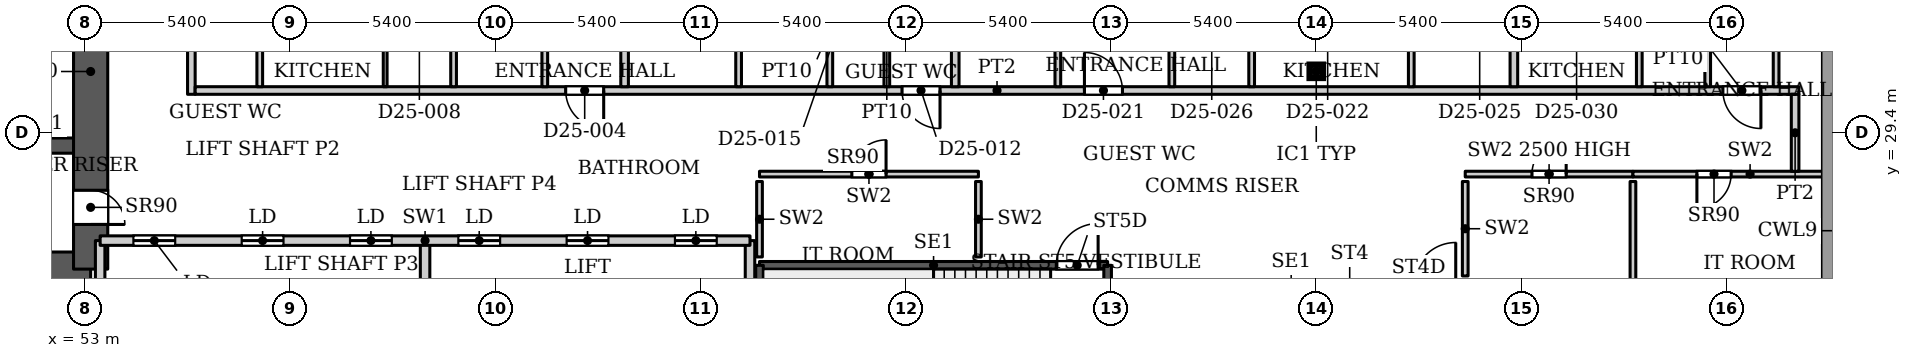
"""IFC4 building model, lengths in metres.
Left out: names, types, materials, properties, quantities, classifications, styles, units other than length and angle.
Written with IfcOpenShell. Run it as: python <this file> out.ifc"""

import sys

from ifc_helpers import new_model, si_unit, direction, frame, frame_2d, origin, origin_2d, place, context, subcontext, project, spatial, rectangle, hollow_rectangle, extrude, source, transform, mapped, element, fill, save


model = new_model("IFC4")
c1 = context("Model", 3, precision=1e-05, world=origin(), true_north=direction((0.0, 1.0)))
c2 = subcontext(c1, "Body", "Model", "MODEL_VIEW")
j1 = project(units=[si_unit("LENGTHUNIT", "METRE"), si_unit("PLANEANGLEUNIT", "RADIAN")], contexts=[c1])
p1 = place(None, origin())
s1 = spatial("IfcSite", under=j1, at=p1, CompositionType="ELEMENT")
p2 = place(p1, origin())
s2 = spatial("IfcBuilding", under=s1, at=p2, CompositionType="ELEMENT")
p3 = place(p2, frame((0.0, 0.0, 113.6)))
s3 = spatial("IfcBuildingStorey", under=s2, at=p3, CompositionType="ELEMENT", Elevation=113.6)
p4 = place(p3, frame((85.4, 31.005, 0.0), z_axis=(0.0, 0.0, 1.0), x_axis=(1.0, 0.0, 0.0)))
e1 = element("IfcColumn", 1, at=p4, inside=s3, PredefinedType="COLUMN", context=c2, shape_type="SweptSolid", body=[
    extrude(hollow_rectangle(XDim=0.356, YDim=0.356, WallThickness=0.016, InnerFilletRadius=0.016, OuterFilletRadius=0.032, at=origin_2d()), origin(), (0.0, 0.0, 1.0), 3.9),
])
p5 = place(p3, frame((34.75, 25.8, 0.0), z_axis=(0.0, 0.0, 1.0), x_axis=(1.0, 0.0, 0.0)))
e2 = element("IfcWall", 2, at=p5, inside=s3, PredefinedType="SHEAR", context=c2, shape_type="SweptSolid", body=[
    extrude(rectangle(XDim=18.4, YDim=0.9, at=frame_2d((9.2, 0.0))), origin(), (0.0, 0.0, 1.0), 3.9),
])
p6 = place(p3, frame((34.75, 29.05, 0.0), z_axis=(0.0, 0.0, 1.0), x_axis=(1.0, 0.0, 0.0)))
e3 = element("IfcWall", 3, at=p6, inside=s3, PredefinedType="SHEAR", context=c2, shape_type="SweptSolid", body=[
    extrude(rectangle(XDim=18.4, YDim=0.4, at=frame_2d((9.2, 0.0))), origin(), (0.0, 0.0, 1.0), 3.9),
])
p7 = place(p6, frame((15.125, 0.0, 0.0)))
e4 = element("IfcOpeningElement", 4, at=p7, cuts=e3, PredefinedType="OPENING", context=c2, shape_type="SweptSolid", body=[
    extrude(rectangle(XDim=1.1, YDim=2.2, at=frame_2d((0.55, 1.1))), frame((0.0, 0.21, 0.0), z_axis=(0.0, -1.0, 0.0), x_axis=(1.0, 0.0, 0.0)), (0.0, 0.0, 1.0), 0.42),
])
p8 = place(p3, frame((53.15, 25.8, 0.0), z_axis=(0.0, 0.0, 1.0), x_axis=(0.0, 1.0, 0.0)))
e5 = element("IfcWall", 5, at=p8, inside=s3, PredefinedType="SHEAR", context=c2, shape_type="SweptSolid", body=[
    extrude(rectangle(XDim=10.4, YDim=0.9, at=frame_2d((5.2, 0.0))), origin(), (0.0, 0.0, 1.0), 3.9),
])
p9 = place(p8, frame((1.175, 0.0, 0.0)))
e6 = element("IfcOpeningElement", 6, at=p9, cuts=e5, PredefinedType="OPENING", context=c2, shape_type="SweptSolid", body=[
    extrude(rectangle(XDim=0.9, YDim=2.2, at=frame_2d((0.45, 1.1))), frame((0.0, 0.46, 0.0), z_axis=(0.0, -1.0, 0.0), x_axis=(1.0, 0.0, 0.0)), (0.0, 0.0, 1.0), 0.92),
])
p10 = place(p3, frame((70.75, 25.9, 0.0), z_axis=(0.0, 0.0, 1.0), x_axis=(1.0, 0.0, 0.0)))
e7 = element("IfcWall", 7, at=p10, inside=s3, PredefinedType="SHEAR", context=c2, shape_type="SweptSolid", body=[
    extrude(rectangle(XDim=9.16, YDim=0.2, at=frame_2d((4.58, 0.0))), origin(), (0.0, 0.0, 1.0), 3.9),
])
p11 = place(p10, frame((7.81, 0.0, 0.0)))
e8 = element("IfcOpeningElement", 8, at=p11, cuts=e7, PredefinedType="OPENING", context=c2, shape_type="SweptSolid", body=[
    extrude(rectangle(XDim=1.1, YDim=2.2, at=frame_2d((0.55, 1.1))), frame((0.0, 0.11, 0.0), z_axis=(0.0, -1.0, 0.0), x_axis=(1.0, 0.0, 0.0)), (0.0, 0.0, 1.0), 0.22),
])
for number, where, z_axis, x_axis in (
    (9, (70.75, 22.75, 0.0), (0.0, 0.0, 1.0), (0.0, 1.0, 0.0)),
    (10, (79.91, 22.75, 0.0), (0.0, 0.0, 1.0), (0.0, 1.0, 0.0)),
):
    element("IfcWall", number, at=place(p3, frame(where, z_axis=z_axis, x_axis=x_axis)), inside=s3, PredefinedType="SHEAR", context=c2, shape_type="SweptSolid", body=[
        extrude(rectangle(XDim=3.15, YDim=0.2, at=frame_2d((1.575, 0.0))), origin(), (0.0, 0.0, 1.0), 3.9),
    ])
for number, where, z_axis, x_axis in (
    (11, (53.4, 23.7, 0.0), (0.0, 0.0, 1.0), (0.0, 1.0, 0.0)),
    (12, (61.95, 23.7, 0.0), (0.0, 0.0, 1.0), (0.0, 1.0, 0.0)),
    (13, (70.5, 23.7, 0.0), (0.0, 0.0, 1.0), (0.0, 1.0, 0.0)),
):
    element("IfcWall", number, at=place(p3, frame(where, z_axis=z_axis, x_axis=x_axis)), inside=s3, PredefinedType="PARTITIONING", context=c2, shape_type="SweptSolid", body=[
        extrude(rectangle(XDim=2.85, YDim=0.25, at=frame_2d((1.425, 0.0))), origin(), (0.0, 0.0, 1.0), 3.9),
    ])
p12 = place(p3, frame((53.4, 26.55, 0.0), z_axis=(0.0, 0.0, 1.0), x_axis=(1.0, 0.0, 0.0)))
e14 = element("IfcWall", 14, at=p12, inside=s3, PredefinedType="PARTITIONING", context=c2, shape_type="SweptSolid", body=[
    extrude(rectangle(XDim=17.1, YDim=0.25, at=frame_2d((8.55, 0.0))), origin(), (0.0, 0.0, 1.0), 3.9),
])
p13 = place(p12, frame((0.875, 0.0, 0.0)))
e15 = element("IfcOpeningElement", 15, at=p13, cuts=e14, PredefinedType="OPENING", context=c2, shape_type="SweptSolid", body=[
    extrude(rectangle(XDim=1.1, YDim=2.2, at=frame_2d((0.55, 1.1))), frame((0.0, 0.135, 0.0), z_axis=(0.0, -1.0, 0.0), x_axis=(1.0, 0.0, 0.0)), (0.0, 0.0, 1.0), 0.27),
])
p14 = place(p12, frame((3.725, 0.0, 0.0)))
e16 = element("IfcOpeningElement", 16, at=p14, cuts=e14, PredefinedType="OPENING", context=c2, shape_type="SweptSolid", body=[
    extrude(rectangle(XDim=1.1, YDim=2.2, at=frame_2d((0.55, 1.1))), frame((0.0, 0.135, 0.0), z_axis=(0.0, -1.0, 0.0), x_axis=(1.0, 0.0, 0.0)), (0.0, 0.0, 1.0), 0.27),
])
p15 = place(p12, frame((6.575, 0.0, 0.0)))
e17 = element("IfcOpeningElement", 17, at=p15, cuts=e14, PredefinedType="OPENING", context=c2, shape_type="SweptSolid", body=[
    extrude(rectangle(XDim=1.1, YDim=2.2, at=frame_2d((0.55, 1.1))), frame((0.0, 0.135, 0.0), z_axis=(0.0, -1.0, 0.0), x_axis=(1.0, 0.0, 0.0)), (0.0, 0.0, 1.0), 0.27),
])
p16 = place(p12, frame((9.425, 0.0, 0.0)))
e18 = element("IfcOpeningElement", 18, at=p16, cuts=e14, PredefinedType="OPENING", context=c2, shape_type="SweptSolid", body=[
    extrude(rectangle(XDim=1.1, YDim=2.2, at=frame_2d((0.55, 1.1))), frame((0.0, 0.135, 0.0), z_axis=(0.0, -1.0, 0.0), x_axis=(1.0, 0.0, 0.0)), (0.0, 0.0, 1.0), 0.27),
])
p17 = place(p12, frame((12.275, 0.0, 0.0)))
e19 = element("IfcOpeningElement", 19, at=p17, cuts=e14, PredefinedType="OPENING", context=c2, shape_type="SweptSolid", body=[
    extrude(rectangle(XDim=1.1, YDim=2.2, at=frame_2d((0.55, 1.1))), frame((0.0, 0.135, 0.0), z_axis=(0.0, -1.0, 0.0), x_axis=(1.0, 0.0, 0.0)), (0.0, 0.0, 1.0), 0.27),
])
p18 = place(p12, frame((15.125, 0.0, 0.0)))
e20 = element("IfcOpeningElement", 20, at=p18, cuts=e14, PredefinedType="OPENING", context=c2, shape_type="SweptSolid", body=[
    extrude(rectangle(XDim=1.1, YDim=2.2, at=frame_2d((0.55, 1.1))), frame((0.0, 0.135, 0.0), z_axis=(0.0, -1.0, 0.0), x_axis=(1.0, 0.0, 0.0)), (0.0, 0.0, 1.0), 0.27),
])
p19 = place(p3, frame((70.75, 28.3, 0.0), z_axis=(0.0, 0.0, 1.0), x_axis=(1.0, 0.0, 0.0)))
e21 = element("IfcWall", 21, at=p19, inside=s3, PredefinedType="PARTITIONING", context=c2, shape_type="SweptSolid", body=[
    extrude(rectangle(XDim=5.76, YDim=0.15, at=frame_2d((2.88, 0.0))), origin(), (0.0, 0.0, 1.0), 3.9),
])
p20 = place(p19, frame((2.43, 0.0, 0.0)))
e22 = element("IfcOpeningElement", 22, at=p20, cuts=e21, PredefinedType="OPENING", context=c2, shape_type="SweptSolid", body=[
    extrude(rectangle(XDim=0.9, YDim=2.2, at=frame_2d((0.45, 1.1))), frame((0.0, 0.085, 0.0), z_axis=(0.0, -1.0, 0.0), x_axis=(1.0, 0.0, 0.0)), (0.0, 0.0, 1.0), 0.17),
])
for number, where, z_axis, x_axis in (
    (23, (70.75, 26.12, 0.0), (0.0, 0.0, 1.0), (0.0, 1.0, 0.0)),
    (24, (76.51, 26.12, 0.0), (0.0, 0.0, 1.0), (0.0, 1.0, 0.0)),
):
    element("IfcWall", number, at=place(p3, frame(where, z_axis=z_axis, x_axis=x_axis)), inside=s3, PredefinedType="PARTITIONING", context=c2, shape_type="SweptSolid", body=[
        extrude(rectangle(XDim=1.985, YDim=0.15, at=frame_2d((0.992, 0.0))), origin(), (0.0, 0.0, 1.0), 3.9),
    ])
p21 = place(p3, frame((89.32, 28.3, 0.0), z_axis=(0.0, 0.0, 1.0), x_axis=(1.0, 0.0, 0.0)))
e25 = element("IfcWall", 25, at=p21, inside=s3, PredefinedType="PARTITIONING", context=c2, shape_type="SweptSolid", body=[
    extrude(rectangle(XDim=4.413, YDim=0.15, at=frame_2d((2.207, 0.0))), origin(), (0.0, 0.0, 1.0), 2.5),
])
p22 = place(p21, frame((1.756, 0.0, 0.0)))
e26 = element("IfcOpeningElement", 26, at=p22, cuts=e25, PredefinedType="OPENING", context=c2, shape_type="SweptSolid", body=[
    extrude(rectangle(XDim=0.9, YDim=2.2, at=frame_2d((0.45, 1.1))), frame((0.0, 0.085, 0.0), z_axis=(0.0, -1.0, 0.0), x_axis=(1.0, 0.0, 0.0)), (0.0, 0.0, 1.0), 0.17),
])
p23 = place(p3, frame((89.32, 25.62, 0.0), z_axis=(0.0, 0.0, 1.0), x_axis=(0.0, 1.0, 0.0)))
e27 = element("IfcWall", 27, at=p23, inside=s3, PredefinedType="PARTITIONING", context=c2, shape_type="SweptSolid", body=[
    extrude(rectangle(XDim=2.485, YDim=0.15, at=frame_2d((1.242, 0.0))), origin(), (0.0, 0.0, 1.0), 3.9),
])
p24 = place(p3, frame((93.733, 21.338, 0.0), z_axis=(0.0, 0.0, 1.0), x_axis=(0.0, 1.0, 0.0)))
e28 = element("IfcWall", 28, at=p24, inside=s3, PredefinedType="PARTITIONING", context=c2, shape_type="SweptSolid", body=[
    extrude(rectangle(XDim=6.767, YDim=0.15, at=frame_2d((3.384, 0.0))), origin(), (0.0, 0.0, 1.0), 3.9),
])
p25 = place(p3, frame((93.733, 28.3, 0.0), z_axis=(0.0, 0.0, 1.0), x_axis=(1.0, 0.0, 0.0)))
e29 = element("IfcWall", 29, at=p25, inside=s3, PredefinedType="PARTITIONING", context=c2, shape_type="SweptSolid", body=[
    extrude(rectangle(XDim=6.165, YDim=0.15, at=frame_2d((3.083, 0.0))), origin(), (0.0, 0.0, 1.0), 3.9),
])
p26 = place(p25, frame((1.683, 0.0, 0.0)))
e30 = element("IfcOpeningElement", 30, at=p26, cuts=e29, PredefinedType="OPENING", context=c2, shape_type="SweptSolid", body=[
    extrude(rectangle(XDim=0.9, YDim=2.2, at=frame_2d((0.45, 1.1))), frame((0.0, 0.085, 0.0), z_axis=(0.0, -1.0, 0.0), x_axis=(1.0, 0.0, 0.0)), (0.0, 0.0, 1.0), 0.17),
])
p27 = place(p3, frame((55.8, 30.4, 0.0), z_axis=(0.0, 0.0, 1.0), x_axis=(0.0, 1.0, 0.0)))
e31 = element("IfcWall", 31, at=p27, inside=s3, PredefinedType="PARTITIONING", context=c2, shape_type="SweptSolid", body=[
    extrude(rectangle(XDim=13.5, YDim=0.2, at=frame_2d((6.75, 0.0))), origin(), (0.0, 0.0, 1.0), 3.6),
])
p28 = place(p3, frame((55.9, 30.5, 0.0), z_axis=(0.0, 0.0, 1.0), x_axis=(1.0, 0.0, 0.0)))
e32 = element("IfcWall", 32, at=p28, inside=s3, PredefinedType="PARTITIONING", context=c2, shape_type="SweptSolid", body=[
    extrude(rectangle(XDim=42.2, YDim=0.2, at=frame_2d((21.1, 0.0))), origin(), (0.0, 0.0, 1.0), 3.6),
])
p29 = place(p28, frame((9.75, 0.0, 0.0)))
e33 = element("IfcOpeningElement", 33, at=p29, cuts=e32, PredefinedType="OPENING", context=c2, shape_type="SweptSolid", body=[
    extrude(rectangle(XDim=1.0, YDim=2.1, at=frame_2d((0.5, 1.05))), frame((0.0, 0.11, 0.0), z_axis=(0.0, -1.0, 0.0), x_axis=(1.0, 0.0, 0.0)), (0.0, 0.0, 1.0), 0.22),
])
p30 = place(p28, frame((18.6, 0.0, 0.0)))
e34 = element("IfcOpeningElement", 34, at=p30, cuts=e32, PredefinedType="OPENING", context=c2, shape_type="SweptSolid", body=[
    extrude(rectangle(XDim=1.0, YDim=2.1, at=frame_2d((0.5, 1.05))), frame((0.0, 0.11, 0.0), z_axis=(0.0, -1.0, 0.0), x_axis=(1.0, 0.0, 0.0)), (0.0, 0.0, 1.0), 0.22),
])
p31 = place(p28, frame((23.4, 0.0, 0.0)))
e35 = element("IfcOpeningElement", 35, at=p31, cuts=e32, PredefinedType="OPENING", context=c2, shape_type="SweptSolid", body=[
    extrude(rectangle(XDim=1.0, YDim=2.1, at=frame_2d((0.5, 1.05))), frame((0.0, 0.11, 0.0), z_axis=(0.0, -1.0, 0.0), x_axis=(1.0, 0.0, 0.0)), (0.0, 0.0, 1.0), 0.22),
])
p32 = place(p28, frame((40.2, 0.0, 0.0)))
e36 = element("IfcOpeningElement", 36, at=p32, cuts=e32, PredefinedType="OPENING", context=c2, shape_type="SweptSolid", body=[
    extrude(rectangle(XDim=1.0, YDim=2.1, at=frame_2d((0.5, 1.05))), frame((0.0, 0.11, 0.0), z_axis=(0.0, -1.0, 0.0), x_axis=(1.0, 0.0, 0.0)), (0.0, 0.0, 1.0), 0.22),
])
p33 = place(p3, frame((57.6, 30.6, 0.0), z_axis=(0.0, 0.0, 1.0), x_axis=(0.0, 1.0, 0.0)))
e37 = element("IfcWall", 37, at=p33, inside=s3, PredefinedType="PARTITIONING", context=c2, shape_type="SweptSolid", body=[
    extrude(rectangle(XDim=3.025, YDim=0.15, at=frame_2d((1.512, 0.0))), origin(), (0.0, 0.0, 1.0), 3.6),
])
p34 = place(p3, frame((60.9, 30.6, 0.0), z_axis=(0.0, 0.0, 1.0), x_axis=(0.0, 1.0, 0.0)))
e38 = element("IfcWall", 38, at=p34, inside=s3, PredefinedType="PARTITIONING", context=c2, shape_type="SweptSolid", body=[
    extrude(rectangle(XDim=3.025, YDim=0.1, at=frame_2d((1.512, 0.0))), origin(), (0.0, 0.0, 1.0), 3.6),
])
for number, where, z_axis, x_axis in (
    (39, (62.7, 30.6, 0.0), (0.0, 0.0, 1.0), (0.0, 1.0, 0.0)),
    (40, (65.1, 30.6, 0.0), (0.0, 0.0, 1.0), (0.0, 1.0, 0.0)),
):
    element("IfcWall", number, at=place(p3, frame(where, z_axis=z_axis, x_axis=x_axis)), inside=s3, PredefinedType="PARTITIONING", context=c2, shape_type="SweptSolid", body=[
        extrude(rectangle(XDim=3.025, YDim=0.15, at=frame_2d((1.512, 0.0))), origin(), (0.0, 0.0, 1.0), 3.6),
    ])
p35 = place(p3, frame((67.2, 30.6, 0.0), z_axis=(0.0, 0.0, 1.0), x_axis=(0.0, 1.0, 0.0)))
e41 = element("IfcWall", 41, at=p35, inside=s3, PredefinedType="PARTITIONING", context=c2, shape_type="SweptSolid", body=[
    extrude(rectangle(XDim=13.3, YDim=0.2, at=frame_2d((6.65, 0.0))), origin(), (0.0, 0.0, 1.0), 3.6),
])
for number, where, z_axis, x_axis in (
    (42, (70.2, 30.6, 0.0), (0.0, 0.0, 1.0), (0.0, 1.0, 0.0)),
    (43, (72.6, 30.6, 0.0), (0.0, 0.0, 1.0), (0.0, 1.0, 0.0)),
    (44, (74.1, 30.6, 0.0), (0.0, 0.0, 1.0), (0.0, 1.0, 0.0)),
):
    element("IfcWall", number, at=place(p3, frame(where, z_axis=z_axis, x_axis=x_axis)), inside=s3, PredefinedType="PARTITIONING", context=c2, shape_type="SweptSolid", body=[
        extrude(rectangle(XDim=3.025, YDim=0.15, at=frame_2d((1.512, 0.0))), origin(), (0.0, 0.0, 1.0), 3.6),
    ])
p36 = place(p3, frame((75.9, 30.6, 0.0), z_axis=(0.0, 0.0, 1.0), x_axis=(0.0, 1.0, 0.0)))
e45 = element("IfcWall", 45, at=p36, inside=s3, PredefinedType="PARTITIONING", context=c2, shape_type="SweptSolid", body=[
    extrude(rectangle(XDim=13.3, YDim=0.2, at=frame_2d((6.65, 0.0))), origin(), (0.0, 0.0, 1.0), 3.6),
])
p37 = place(p3, frame((78.6, 30.6, 0.0), z_axis=(0.0, 0.0, 1.0), x_axis=(0.0, 1.0, 0.0)))
e46 = element("IfcWall", 46, at=p37, inside=s3, PredefinedType="PARTITIONING", context=c2, shape_type="SweptSolid", body=[
    extrude(rectangle(XDim=3.175, YDim=0.15, at=frame_2d((1.587, 0.0))), origin(), (0.0, 0.0, 1.0), 3.6),
])
for number, where, z_axis, x_axis in (
    (47, (81.6, 30.6, 0.0), (0.0, 0.0, 1.0), (0.0, 1.0, 0.0)),
    (48, (83.7, 30.6, 0.0), (0.0, 0.0, 1.0), (0.0, 1.0, 0.0)),
    (49, (87.9, 30.6, 0.0), (0.0, 0.0, 1.0), (0.0, 1.0, 0.0)),
):
    element("IfcWall", number, at=place(p3, frame(where, z_axis=z_axis, x_axis=x_axis)), inside=s3, PredefinedType="PARTITIONING", context=c2, shape_type="SweptSolid", body=[
        extrude(rectangle(XDim=3.025, YDim=0.15, at=frame_2d((1.512, 0.0))), origin(), (0.0, 0.0, 1.0), 3.6),
    ])
p38 = place(p3, frame((90.6, 30.6, 0.0), z_axis=(0.0, 0.0, 1.0), x_axis=(0.0, 1.0, 0.0)))
e50 = element("IfcWall", 50, at=p38, inside=s3, PredefinedType="PARTITIONING", context=c2, shape_type="SweptSolid", body=[
    extrude(rectangle(XDim=13.3, YDim=0.2, at=frame_2d((6.65, 0.0))), origin(), (0.0, 0.0, 1.0), 2.5),
])
for number, where, z_axis, x_axis in (
    (51, (93.9, 30.6, 0.0), (0.0, 0.0, 1.0), (0.0, 1.0, 0.0)),
    (52, (95.7, 30.6, 0.0), (0.0, 0.0, 1.0), (0.0, 1.0, 0.0)),
):
    element("IfcWall", number, at=place(p3, frame(where, z_axis=z_axis, x_axis=x_axis)), inside=s3, PredefinedType="PARTITIONING", context=c2, shape_type="SweptSolid", body=[
        extrude(rectangle(XDim=3.025, YDim=0.15, at=frame_2d((1.512, 0.0))), origin(), (0.0, 0.0, 1.0), 3.6),
    ])
p39 = place(p3, frame((97.5, 30.6, 0.0), z_axis=(0.0, 0.0, 1.0), x_axis=(0.0, 1.0, 0.0)))
e53 = element("IfcWall", 53, at=p39, inside=s3, PredefinedType="PARTITIONING", context=c2, shape_type="SweptSolid", body=[
    extrude(rectangle(XDim=3.175, YDim=0.15, at=frame_2d((1.587, 0.0))), origin(), (0.0, 0.0, 1.0), 3.6),
])
p40 = place(p3, frame((98.0, 28.374, 0.0), z_axis=(0.0, 0.0, 1.0), x_axis=(0.0, 1.0, 0.0)))
e54 = element("IfcWall", 54, at=p40, inside=s3, PredefinedType="PARTITIONING", context=c2, shape_type="SweptSolid", body=[
    extrude(rectangle(XDim=2.026, YDim=0.2, at=frame_2d((1.013, 0.0))), origin(), (0.0, 0.0, 1.0), 3.6),
])
m1 = source(origin(), c2, "Body", "SweptSolid", [
    extrude(rectangle(XDim=1.1, YDim=2.2, at=frame_2d((0.55, 1.1))), frame((0.0, 0.025, 0.0), z_axis=(0.0, -1.0, 0.0), x_axis=(1.0, 0.0, 0.0)), (0.0, 0.0, 1.0), 0.05),
])
p41 = place(p13, origin())
e55 = element("IfcDoor", 55, at=p41, inside=s3, OperationType="SLIDING_TO_LEFT", PredefinedType="DOOR", context=c2, shape_type="MappedRepresentation", body=[
    mapped(m1, transform((0.0, 0.0, 0.0), x_axis=(1.0, 0.0, 0.0), y_axis=(0.0, 1.0, 0.0), z_axis=(0.0, 0.0, 1.0), scale=1.0)),
])
fill(e15, e55)
p42 = place(p14, origin())
e56 = element("IfcDoor", 56, at=p42, inside=s3, OperationType="SLIDING_TO_LEFT", PredefinedType="DOOR", context=c2, shape_type="MappedRepresentation", body=[
    mapped(m1, transform((0.0, 0.0, 0.0), x_axis=(1.0, 0.0, 0.0), y_axis=(0.0, 1.0, 0.0), z_axis=(0.0, 0.0, 1.0), scale=1.0)),
])
fill(e16, e56)
p43 = place(p15, origin())
e57 = element("IfcDoor", 57, at=p43, inside=s3, OperationType="SLIDING_TO_LEFT", PredefinedType="DOOR", context=c2, shape_type="MappedRepresentation", body=[
    mapped(m1, transform((0.0, 0.0, 0.0), x_axis=(1.0, 0.0, 0.0), y_axis=(0.0, 1.0, 0.0), z_axis=(0.0, 0.0, 1.0), scale=1.0)),
])
fill(e17, e57)
p44 = place(p16, origin())
e58 = element("IfcDoor", 58, at=p44, inside=s3, OperationType="SLIDING_TO_LEFT", PredefinedType="DOOR", context=c2, shape_type="MappedRepresentation", body=[
    mapped(m1, transform((0.0, 0.0, 0.0), x_axis=(1.0, 0.0, 0.0), y_axis=(0.0, 1.0, 0.0), z_axis=(0.0, 0.0, 1.0), scale=1.0)),
])
fill(e18, e58)
p45 = place(p17, origin())
e59 = element("IfcDoor", 59, at=p45, inside=s3, OperationType="SLIDING_TO_LEFT", PredefinedType="DOOR", context=c2, shape_type="MappedRepresentation", body=[
    mapped(m1, transform((0.0, 0.0, 0.0), x_axis=(1.0, 0.0, 0.0), y_axis=(0.0, 1.0, 0.0), z_axis=(0.0, 0.0, 1.0), scale=1.0)),
])
fill(e19, e59)
p46 = place(p18, origin())
e60 = element("IfcDoor", 60, at=p46, inside=s3, OperationType="SLIDING_TO_LEFT", PredefinedType="DOOR", context=c2, shape_type="MappedRepresentation", body=[
    mapped(m1, transform((0.0, 0.0, 0.0), x_axis=(1.0, 0.0, 0.0), y_axis=(0.0, 1.0, 0.0), z_axis=(0.0, 0.0, 1.0), scale=1.0)),
])
fill(e20, e60)
m2 = source(origin(), c2, "Body", "SweptSolid", [
    extrude(rectangle(XDim=0.9, YDim=2.2, at=frame_2d((0.45, 1.1))), frame((0.0, 0.025, 0.0), z_axis=(0.0, -1.0, 0.0), x_axis=(1.0, 0.0, 0.0)), (0.0, 0.0, 1.0), 0.05),
])
p47 = place(p9, origin())
e61 = element("IfcDoor", 61, at=p47, inside=s3, OperationType="SINGLE_SWING_RIGHT", PredefinedType="DOOR", context=c2, shape_type="MappedRepresentation", body=[
    mapped(m2, transform((0.0, 0.0, 0.0), x_axis=(1.0, 0.0, 0.0), y_axis=(0.0, 1.0, 0.0), z_axis=(0.0, 0.0, 1.0), scale=1.0)),
])
fill(e6, e61)
p48 = place(p20, origin())
e62 = element("IfcDoor", 62, at=p48, inside=s3, OperationType="SINGLE_SWING_LEFT", PredefinedType="DOOR", context=c2, shape_type="MappedRepresentation", body=[
    mapped(m2, transform((0.0, 0.0, 0.0), x_axis=(1.0, 0.0, 0.0), y_axis=(0.0, 1.0, 0.0), z_axis=(0.0, 0.0, 1.0), scale=1.0)),
])
fill(e22, e62)
p49 = place(p22, origin())
e63 = element("IfcDoor", 63, at=p49, inside=s3, OperationType="SINGLE_SWING_LEFT", PredefinedType="DOOR", context=c2, shape_type="MappedRepresentation", body=[
    mapped(m2, transform((0.0, 0.0, 0.0), x_axis=(1.0, 0.0, 0.0), y_axis=(0.0, 1.0, 0.0), z_axis=(0.0, 0.0, 1.0), scale=1.0)),
])
fill(e26, e63)
p50 = place(p26, origin())
e64 = element("IfcDoor", 64, at=p50, inside=s3, OperationType="SINGLE_SWING_RIGHT", PredefinedType="DOOR", context=c2, shape_type="MappedRepresentation", body=[
    mapped(m2, transform((0.0, 0.0, 0.0), x_axis=(1.0, 0.0, 0.0), y_axis=(0.0, 1.0, 0.0), z_axis=(0.0, 0.0, 1.0), scale=1.0)),
])
fill(e30, e64)
m3 = source(origin(), c2, "Body", "SweptSolid", [
    extrude(rectangle(XDim=1.1, YDim=2.2, at=frame_2d((0.55, 1.1))), frame((0.0, 0.025, 0.0), z_axis=(0.0, -1.0, 0.0), x_axis=(1.0, 0.0, 0.0)), (0.0, 0.0, 1.0), 0.05),
])
p51 = place(p11, origin())
e65 = element("IfcDoor", 65, at=p51, inside=s3, OperationType="SINGLE_SWING_LEFT", PredefinedType="DOOR", context=c2, shape_type="MappedRepresentation", body=[
    mapped(m3, transform((0.0, 0.0, 0.0), x_axis=(1.0, 0.0, 0.0), y_axis=(0.0, 1.0, 0.0), z_axis=(0.0, 0.0, 1.0), scale=1.0)),
])
fill(e8, e65)
m4 = source(origin(), c2, "Body", "SweptSolid", [
    extrude(rectangle(XDim=1.0, YDim=2.1, at=frame_2d((0.5, 1.05))), frame((0.0, 0.025, 0.0), z_axis=(0.0, -1.0, 0.0), x_axis=(1.0, 0.0, 0.0)), (0.0, 0.0, 1.0), 0.05),
])
p52 = place(p29, origin())
e66 = element("IfcDoor", 66, at=p52, inside=s3, OperationType="SINGLE_SWING_RIGHT", PredefinedType="DOOR", context=c2, shape_type="MappedRepresentation", body=[
    mapped(m4, transform((0.0, 0.0, 0.0), x_axis=(1.0, 0.0, 0.0), y_axis=(0.0, 1.0, 0.0), z_axis=(0.0, 0.0, 1.0), scale=1.0)),
])
fill(e33, e66)
p53 = place(p30, origin())
e67 = element("IfcDoor", 67, at=p53, inside=s3, OperationType="SINGLE_SWING_RIGHT", PredefinedType="DOOR", context=c2, shape_type="MappedRepresentation", body=[
    mapped(m4, transform((0.0, 0.0, 0.0), x_axis=(1.0, 0.0, 0.0), y_axis=(0.0, 1.0, 0.0), z_axis=(0.0, 0.0, 1.0), scale=1.0)),
])
fill(e34, e67)
p54 = place(p31, origin())
e68 = element("IfcDoor", 68, at=p54, inside=s3, OperationType="SINGLE_SWING_LEFT", PredefinedType="DOOR", context=c2, shape_type="MappedRepresentation", body=[
    mapped(m4, transform((0.0, 0.0, 0.0), x_axis=(1.0, 0.0, 0.0), y_axis=(0.0, 1.0, 0.0), z_axis=(0.0, 0.0, 1.0), scale=1.0)),
])
fill(e35, e68)
p55 = place(p32, origin())
e69 = element("IfcDoor", 69, at=p55, inside=s3, OperationType="SINGLE_SWING_RIGHT", PredefinedType="DOOR", context=c2, shape_type="MappedRepresentation", body=[
    mapped(m4, transform((0.0, 0.0, 0.0), x_axis=(1.0, 0.0, 0.0), y_axis=(0.0, 1.0, 0.0), z_axis=(0.0, 0.0, 1.0), scale=1.0)),
])
fill(e36, e69)
save(model, sys.argv[1])
